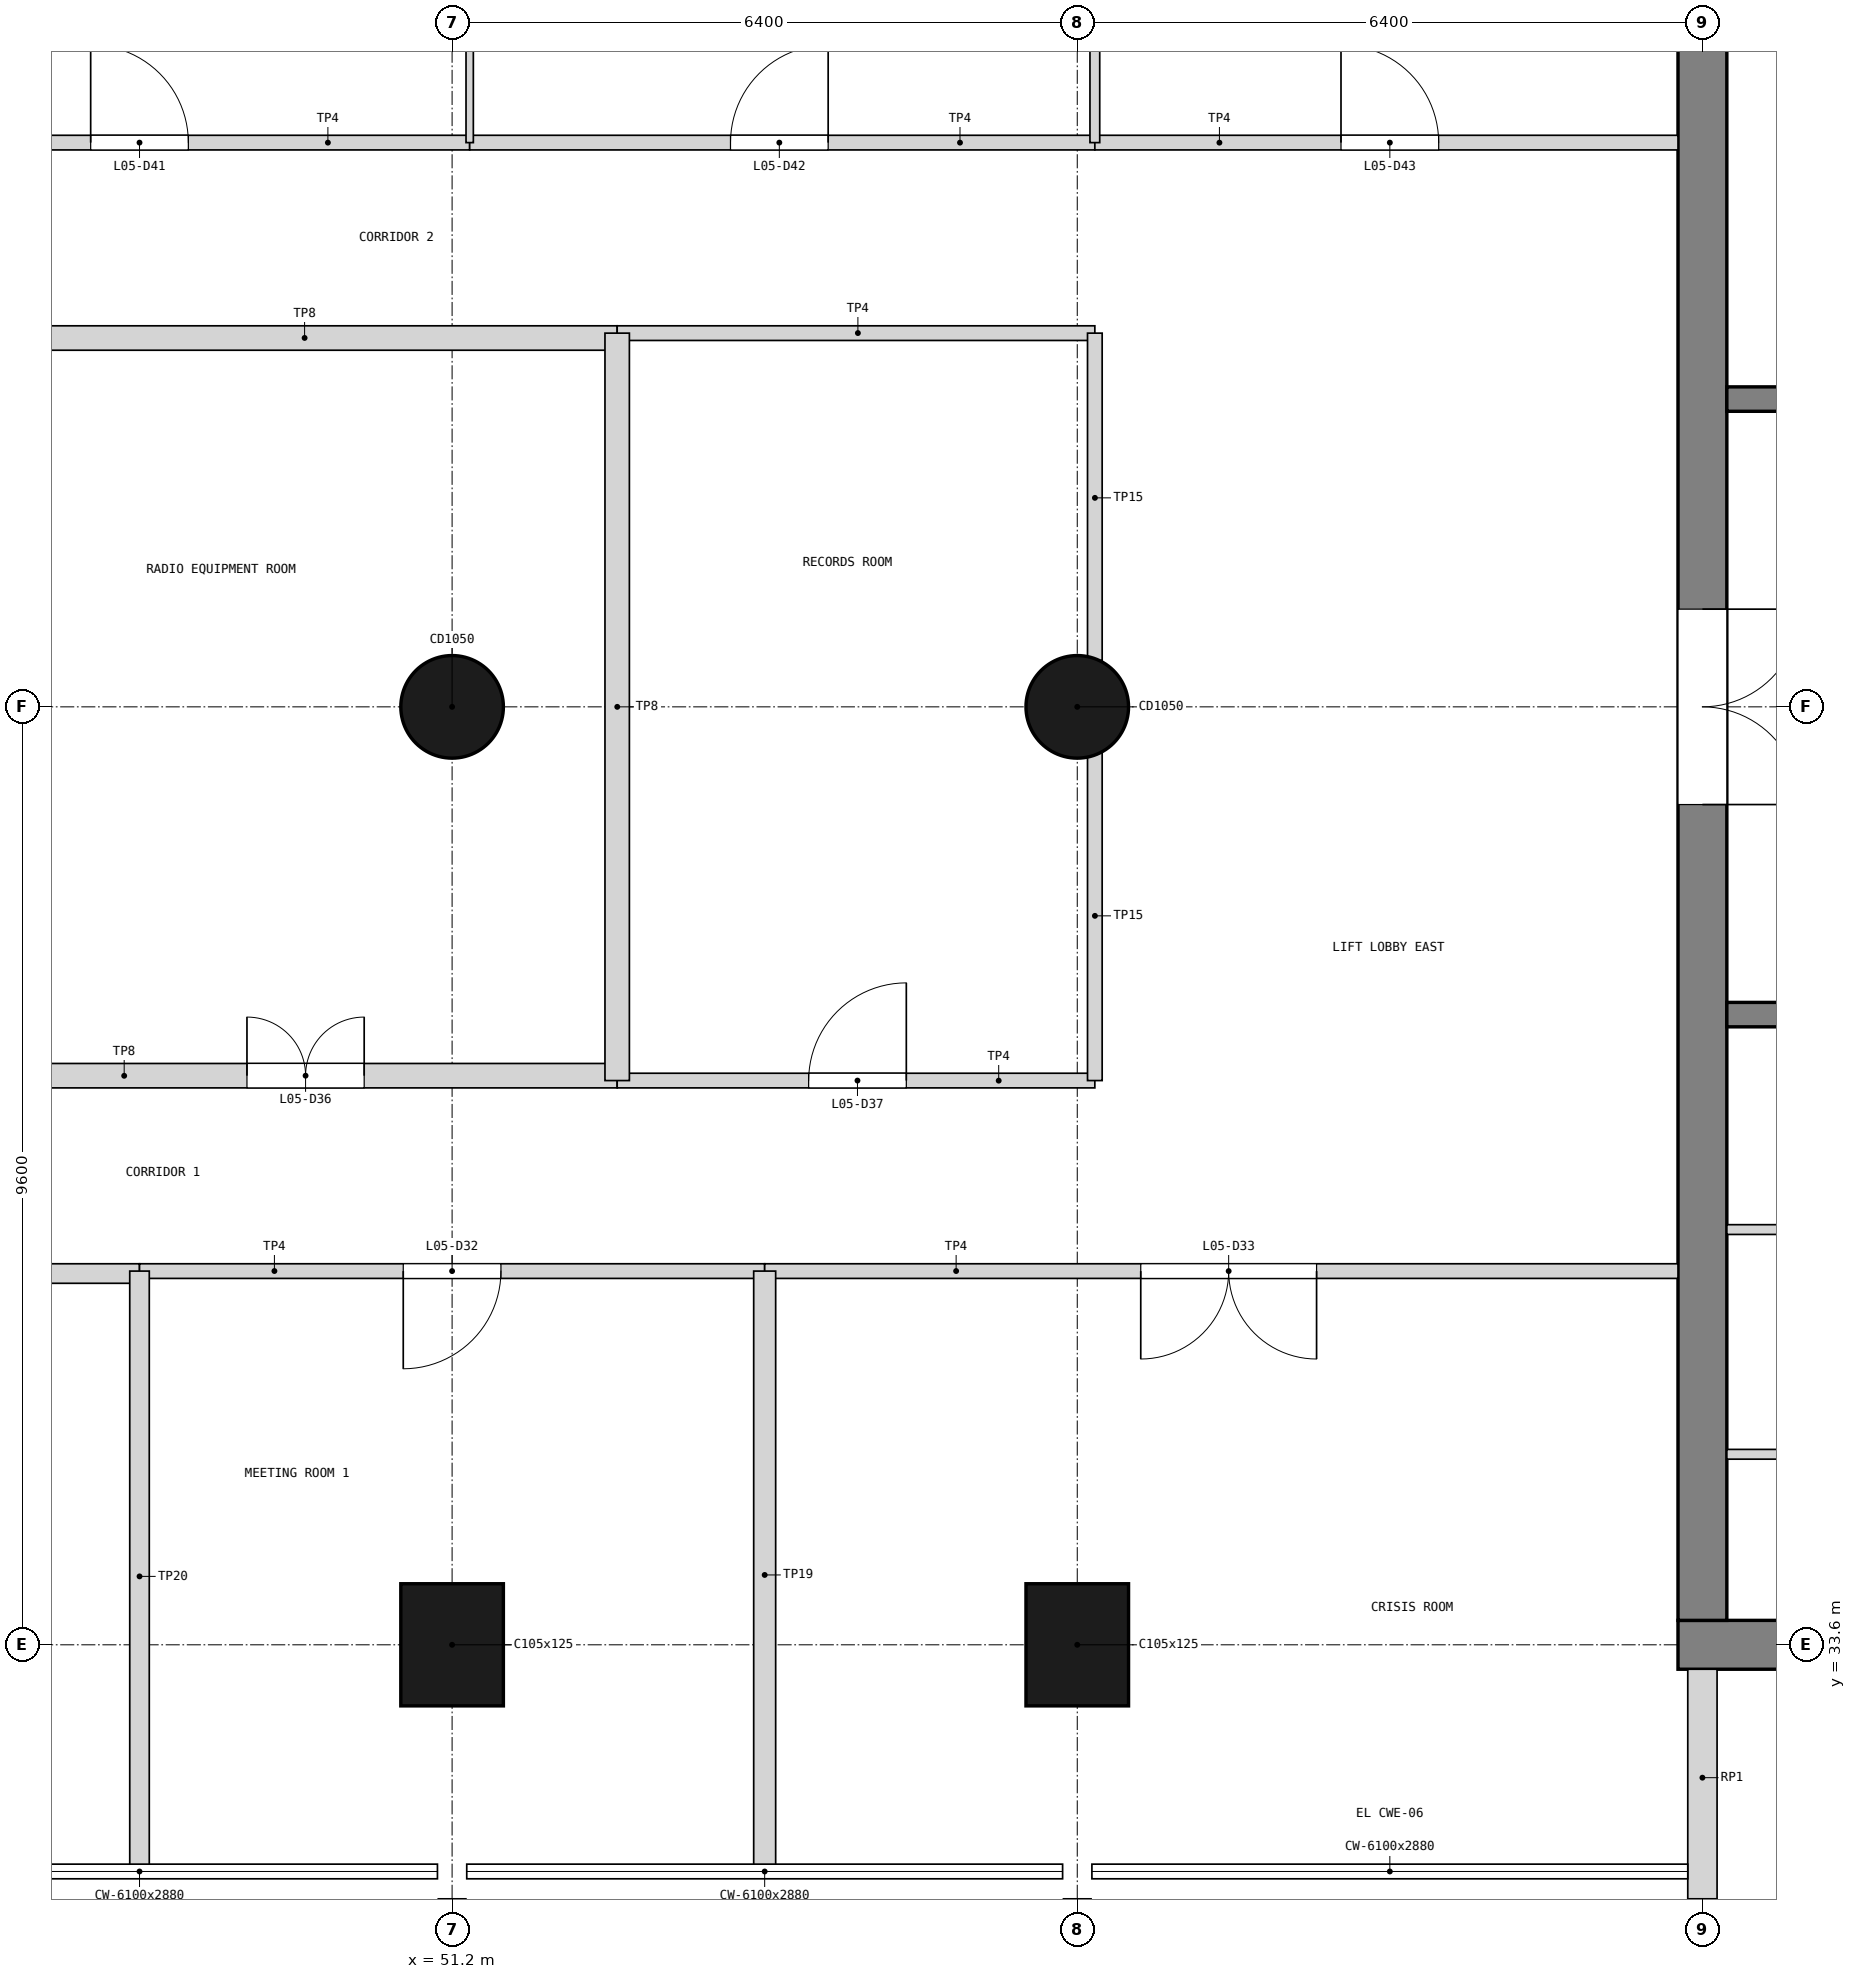
"""IFC4 building model, lengths in metres.
Left out: names, types, materials, properties, quantities, classifications, styles, units other than length and angle.
Written with IfcOpenShell. Run it as: python <this file> out.ifc"""

import sys

from ifc_helpers import new_model, si_unit, direction, frame, frame_2d, origin, origin_2d, place, context, subcontext, project, spatial, rectangle, circle, extrude, element, fill, save


model = new_model("IFC4")
c1 = context("Model", 3, precision=1e-05, world=origin(), true_north=direction((0.0, 1.0)))
c2 = subcontext(c1, "Body", "Model", "MODEL_VIEW")
j1 = project(units=[si_unit("LENGTHUNIT", "METRE"), si_unit("PLANEANGLEUNIT", "RADIAN")], contexts=[c1])
p1 = place(None, origin())
s1 = spatial("IfcSite", under=j1, at=p1, CompositionType="ELEMENT")
p2 = place(p1, origin())
s2 = spatial("IfcBuilding", under=s1, at=p2, CompositionType="ELEMENT")
p3 = place(p2, frame((0.0, 0.0, 21.0)))
s3 = spatial("IfcBuildingStorey", under=s2, at=p3, CompositionType="ELEMENT", Elevation=21.0)
p4 = place(p3, frame((63.75, 33.6, 0.0), z_axis=(0.0, 0.0, 1.0), x_axis=(1.0, 0.0, 0.0)))
e1 = element("IfcWall", 1, at=p4, inside=s3, PredefinedType="SHEAR", context=c2, shape_type="SweptSolid", body=[
    extrude(rectangle(XDim=13.3, YDim=0.5, at=frame_2d((6.65, 0.0))), origin(), (0.0, 0.0, 1.0), 3.9),
])
p5 = place(p4, frame((11.05, 0.0, 1.0)))
e2 = element("IfcOpeningElement", 2, at=p5, cuts=e1, PredefinedType="OPENING", context=c2, shape_type="SweptSolid", body=[
    extrude(rectangle(XDim=0.4, YDim=2.0, at=frame_2d((0.2, 1.0))), frame((0.0, 0.26, 0.0), z_axis=(0.0, -1.0, 0.0), x_axis=(1.0, 0.0, 0.0)), (0.0, 0.0, 1.0), 0.52),
])
p6 = place(p3, frame((64.0, 33.85, 0.0), z_axis=(0.0, 0.0, 1.0), x_axis=(0.0, 1.0, 0.0)))
e3 = element("IfcWall", 3, at=p6, inside=s3, PredefinedType="SHEAR", context=c2, shape_type="SweptSolid", body=[
    extrude(rectangle(XDim=18.7, YDim=0.5, at=frame_2d((9.35, 0.0))), origin(), (0.0, 0.0, 1.0), 3.9),
])
p7 = place(p6, frame((8.35, 0.0, 0.0)))
e4 = element("IfcOpeningElement", 4, at=p7, cuts=e3, PredefinedType="OPENING", context=c2, shape_type="SweptSolid", body=[
    extrude(rectangle(XDim=2.0, YDim=2.1, at=frame_2d((1.0, 1.05))), frame((0.0, 0.26, 0.0), z_axis=(0.0, -1.0, 0.0), x_axis=(1.0, 0.0, 0.0)), (0.0, 0.0, 1.0), 0.52),
])
p8 = place(p3, frame((51.2, 33.6, 0.0), z_axis=(0.0, 0.0, 1.0), x_axis=(1.0, 0.0, 0.0)))
e5 = element("IfcColumn", 5, at=p8, inside=s3, PredefinedType="COLUMN", context=c2, shape_type="SweptSolid", body=[
    extrude(rectangle(XDim=1.05, YDim=1.25, at=origin_2d()), origin(), (0.0, 0.0, 1.0), 3.9),
])
p9 = place(p3, frame((51.2, 43.2, 0.0), z_axis=(0.0, 0.0, 1.0), x_axis=(1.0, 0.0, 0.0)))
e6 = element("IfcColumn", 6, at=p9, inside=s3, PredefinedType="COLUMN", context=c2, shape_type="SweptSolid", body=[
    extrude(circle(Radius=0.525, at=origin_2d()), origin(), (0.0, 0.0, 1.0), 3.9),
])
p10 = place(p3, frame((57.6, 33.6, 0.0), z_axis=(0.0, 0.0, 1.0), x_axis=(1.0, 0.0, 0.0)))
e7 = element("IfcColumn", 7, at=p10, inside=s3, PredefinedType="COLUMN", context=c2, shape_type="SweptSolid", body=[
    extrude(rectangle(XDim=1.05, YDim=1.25, at=origin_2d()), origin(), (0.0, 0.0, 1.0), 3.9),
])
p11 = place(p3, frame((57.6, 43.2, 0.0), z_axis=(0.0, 0.0, 1.0), x_axis=(1.0, 0.0, 0.0)))
e8 = element("IfcColumn", 8, at=p11, inside=s3, PredefinedType="COLUMN", context=c2, shape_type="SweptSolid", body=[
    extrude(circle(Radius=0.525, at=origin_2d()), origin(), (0.0, 0.0, 1.0), 3.9),
])
p12 = place(p3, frame((64.0, 31.0, 0.0), z_axis=(0.0, 0.0, 1.0), x_axis=(0.0, 1.0, 0.0)))
e9 = element("IfcWall", 9, at=p12, inside=s3, PredefinedType="SOLIDWALL", context=c2, shape_type="SweptSolid", body=[
    extrude(rectangle(XDim=2.35, YDim=0.3, at=frame_2d((1.175, 0.0))), origin(), (0.0, 0.0, 1.0), 2.88),
])
for number, where, z_axis, x_axis in (
    (10, (69.725, 40.05, 0.0), (0.0, 0.0, 1.0), (-1.0, 0.0, 0.0)),
    (11, (69.725, 46.35, 0.0), (0.0, 0.0, 1.0), (-1.0, 0.0, 0.0)),
):
    element("IfcWall", number, at=place(p3, frame(where, z_axis=z_axis, x_axis=x_axis)), inside=s3, PredefinedType="SOLIDWALL", context=c2, shape_type="SweptSolid", body=[
        extrude(rectangle(XDim=5.475, YDim=0.25, at=frame_2d((2.738, 0.0))), origin(), (0.0, 0.0, 1.0), 3.6),
    ])
p13 = place(p3, frame((69.475, 35.55, 0.0), z_axis=(0.0, 0.0, 1.0), x_axis=(-1.0, 0.0, 0.0)))
e12 = element("IfcWall", 12, at=p13, inside=s3, PredefinedType="PARTITIONING", context=c2, shape_type="SweptSolid", body=[
    extrude(rectangle(XDim=5.225, YDim=0.1, at=frame_2d((2.613, 0.0))), origin(), (0.0, 0.0, 1.0), 3.6),
])
p14 = place(p3, frame((67.925, 37.85, 0.0), z_axis=(0.0, 0.0, 1.0), x_axis=(-1.0, 0.0, 0.0)))
e13 = element("IfcWall", 13, at=p14, inside=s3, PredefinedType="PARTITIONING", context=c2, shape_type="SweptSolid", body=[
    extrude(rectangle(XDim=3.675, YDim=0.1, at=frame_2d((1.837, 0.0))), origin(), (0.0, 0.0, 1.0), 3.6),
])
p15 = place(p3, frame((40.09, 37.4, 0.0), z_axis=(0.0, 0.0, 1.0), x_axis=(1.0, 0.0, 0.0)))
e14 = element("IfcWall", 14, at=p15, inside=s3, PredefinedType="PARTITIONING", context=c2, shape_type="SweptSolid", body=[
    extrude(rectangle(XDim=7.91, YDim=0.2, at=frame_2d((3.955, 0.0))), origin(), (0.0, 0.0, 1.0), 3.68),
])
p16 = place(p15, frame((3.46, 0.0, 0.0)))
e15 = element("IfcOpeningElement", 15, at=p16, cuts=e14, PredefinedType="OPENING", context=c2, shape_type="SweptSolid", body=[
    extrude(rectangle(XDim=1.0, YDim=2.1, at=frame_2d((0.5, 1.05))), frame((0.0, 0.11, 0.0), z_axis=(0.0, -1.0, 0.0), x_axis=(1.0, 0.0, 0.0)), (0.0, 0.0, 1.0), 0.22),
])
p17 = place(p3, frame((48.0, 37.425, 0.0), z_axis=(0.0, 0.0, 1.0), x_axis=(1.0, 0.0, 0.0)))
e16 = element("IfcWall", 16, at=p17, inside=s3, PredefinedType="PARTITIONING", context=c2, shape_type="SweptSolid", body=[
    extrude(rectangle(XDim=6.4, YDim=0.15, at=frame_2d((3.2, 0.0))), origin(), (0.0, 0.0, 1.0), 3.68),
])
p18 = place(p17, frame((2.7, 0.0, 0.0)))
e17 = element("IfcOpeningElement", 17, at=p18, cuts=e16, PredefinedType="OPENING", context=c2, shape_type="SweptSolid", body=[
    extrude(rectangle(XDim=1.0, YDim=2.1, at=frame_2d((0.5, 1.05))), frame((0.0, 0.085, 0.0), z_axis=(0.0, -1.0, 0.0), x_axis=(1.0, 0.0, 0.0)), (0.0, 0.0, 1.0), 0.17),
])
p19 = place(p3, frame((54.4, 37.425, 0.0), z_axis=(0.0, 0.0, 1.0), x_axis=(1.0, 0.0, 0.0)))
e18 = element("IfcWall", 18, at=p19, inside=s3, PredefinedType="PARTITIONING", context=c2, shape_type="SweptSolid", body=[
    extrude(rectangle(XDim=9.35, YDim=0.15, at=frame_2d((4.675, 0.0))), origin(), (0.0, 0.0, 1.0), 3.68),
])
p20 = place(p19, frame((3.85, 0.0, 0.0)))
e19 = element("IfcOpeningElement", 19, at=p20, cuts=e18, PredefinedType="OPENING", context=c2, shape_type="SweptSolid", body=[
    extrude(rectangle(XDim=1.8, YDim=2.1, at=frame_2d((0.9, 1.05))), frame((0.0, 0.085, 0.0), z_axis=(0.0, -1.0, 0.0), x_axis=(1.0, 0.0, 0.0)), (0.0, 0.0, 1.0), 0.17),
])
p21 = place(p3, frame((48.0, 31.3, 0.0), z_axis=(0.0, 0.0, 1.0), x_axis=(0.0, 1.0, 0.0)))
e20 = element("IfcWall", 20, at=p21, inside=s3, PredefinedType="PARTITIONING", context=c2, shape_type="SweptSolid", body=[
    extrude(rectangle(XDim=6.125, YDim=0.2, at=frame_2d((3.062, 0.0))), origin(), (0.0, 0.0, 1.0), 3.08),
])
p22 = place(p3, frame((54.4, 31.3, 0.0), z_axis=(0.0, 0.0, 1.0), x_axis=(0.0, 1.0, 0.0)))
e21 = element("IfcWall", 21, at=p22, inside=s3, PredefinedType="PARTITIONING", context=c2, shape_type="SweptSolid", body=[
    extrude(rectangle(XDim=6.125, YDim=0.225, at=frame_2d((3.062, 0.0))), origin(), (0.0, 0.0, 1.0), 3.08),
])
p23 = place(p3, frame((46.49, 39.425, 0.0), z_axis=(0.0, 0.0, 1.0), x_axis=(1.0, 0.0, 0.0)))
e22 = element("IfcWall", 22, at=p23, inside=s3, PredefinedType="PARTITIONING", context=c2, shape_type="SweptSolid", body=[
    extrude(rectangle(XDim=6.4, YDim=0.25, at=frame_2d((3.2, 0.0))), origin(), (0.0, 0.0, 1.0), 3.68),
])
p24 = place(p23, frame((2.61, 0.0, 0.0)))
e23 = element("IfcOpeningElement", 23, at=p24, cuts=e22, PredefinedType="OPENING", context=c2, shape_type="SweptSolid", body=[
    extrude(rectangle(XDim=1.2, YDim=2.1, at=frame_2d((0.6, 1.05))), frame((0.0, 0.135, 0.0), z_axis=(0.0, -1.0, 0.0), x_axis=(1.0, 0.0, 0.0)), (0.0, 0.0, 1.0), 0.27),
])
p25 = place(p3, frame((46.49, 46.975, 0.0), z_axis=(0.0, 0.0, 1.0), x_axis=(1.0, 0.0, 0.0)))
e24 = element("IfcWall", 24, at=p25, inside=s3, PredefinedType="PARTITIONING", context=c2, shape_type="SweptSolid", body=[
    extrude(rectangle(XDim=6.4, YDim=0.25, at=frame_2d((3.2, 0.0))), origin(), (0.0, 0.0, 1.0), 3.68),
])
p26 = place(p3, frame((52.89, 39.375, 0.0), z_axis=(0.0, 0.0, 1.0), x_axis=(1.0, 0.0, 0.0)))
e25 = element("IfcWall", 25, at=p26, inside=s3, PredefinedType="PARTITIONING", context=c2, shape_type="SweptSolid", body=[
    extrude(rectangle(XDim=4.89, YDim=0.15, at=frame_2d((2.445, 0.0))), origin(), (0.0, 0.0, 1.0), 3.68),
])
p27 = place(p26, frame((1.96, 0.0, 0.0)))
e26 = element("IfcOpeningElement", 26, at=p27, cuts=e25, PredefinedType="OPENING", context=c2, shape_type="SweptSolid", body=[
    extrude(rectangle(XDim=1.0, YDim=2.1, at=frame_2d((0.5, 1.05))), frame((0.0, 0.085, 0.0), z_axis=(0.0, -1.0, 0.0), x_axis=(1.0, 0.0, 0.0)), (0.0, 0.0, 1.0), 0.17),
])
p28 = place(p3, frame((52.89, 47.025, 0.0), z_axis=(0.0, 0.0, 1.0), x_axis=(1.0, 0.0, 0.0)))
e27 = element("IfcWall", 27, at=p28, inside=s3, PredefinedType="PARTITIONING", context=c2, shape_type="SweptSolid", body=[
    extrude(rectangle(XDim=4.89, YDim=0.15, at=frame_2d((2.445, 0.0))), origin(), (0.0, 0.0, 1.0), 3.68),
])
p29 = place(p3, frame((52.89, 39.375, 0.0), z_axis=(0.0, 0.0, 1.0), x_axis=(0.0, 1.0, 0.0)))
e28 = element("IfcWall", 28, at=p29, inside=s3, PredefinedType="PARTITIONING", context=c2, shape_type="SweptSolid", body=[
    extrude(rectangle(XDim=7.65, YDim=0.25, at=frame_2d((3.825, 0.0))), origin(), (0.0, 0.0, 1.0), 3.68),
])
p30 = place(p3, frame((44.62, 48.975, 0.0), z_axis=(0.0, 0.0, 1.0), x_axis=(1.0, 0.0, 0.0)))
e29 = element("IfcWall", 29, at=p30, inside=s3, PredefinedType="PARTITIONING", context=c2, shape_type="SweptSolid", body=[
    extrude(rectangle(XDim=6.76, YDim=0.15, at=frame_2d((3.38, 0.0))), origin(), (0.0, 0.0, 1.0), 3.68),
])
p31 = place(p30, frame((2.88, 0.0, 0.0)))
e30 = element("IfcOpeningElement", 30, at=p31, cuts=e29, PredefinedType="OPENING", context=c2, shape_type="SweptSolid", body=[
    extrude(rectangle(XDim=1.0, YDim=2.1, at=frame_2d((0.5, 1.05))), frame((0.0, 0.085, 0.0), z_axis=(0.0, -1.0, 0.0), x_axis=(1.0, 0.0, 0.0)), (0.0, 0.0, 1.0), 0.17),
])
p32 = place(p3, frame((51.38, 48.975, 0.0), z_axis=(0.0, 0.0, 1.0), x_axis=(1.0, 0.0, 0.0)))
e31 = element("IfcWall", 31, at=p32, inside=s3, PredefinedType="PARTITIONING", context=c2, shape_type="SweptSolid", body=[
    extrude(rectangle(XDim=6.4, YDim=0.15, at=frame_2d((3.2, 0.0))), origin(), (0.0, 0.0, 1.0), 3.68),
])
p33 = place(p32, frame((2.67, 0.0, 0.0)))
e32 = element("IfcOpeningElement", 32, at=p33, cuts=e31, PredefinedType="OPENING", context=c2, shape_type="SweptSolid", body=[
    extrude(rectangle(XDim=1.0, YDim=2.1, at=frame_2d((0.5, 1.05))), frame((0.0, 0.085, 0.0), z_axis=(0.0, -1.0, 0.0), x_axis=(1.0, 0.0, 0.0)), (0.0, 0.0, 1.0), 0.17),
])
p34 = place(p3, frame((57.78, 48.975, 0.0), z_axis=(0.0, 0.0, 1.0), x_axis=(1.0, 0.0, 0.0)))
e33 = element("IfcWall", 33, at=p34, inside=s3, PredefinedType="PARTITIONING", context=c2, shape_type="SweptSolid", body=[
    extrude(rectangle(XDim=5.97, YDim=0.15, at=frame_2d((2.985, 0.0))), origin(), (0.0, 0.0, 1.0), 3.68),
])
p35 = place(p34, frame((2.52, 0.0, 0.0)))
e34 = element("IfcOpeningElement", 34, at=p35, cuts=e33, PredefinedType="OPENING", context=c2, shape_type="SweptSolid", body=[
    extrude(rectangle(XDim=1.0, YDim=2.1, at=frame_2d((0.5, 1.05))), frame((0.0, 0.085, 0.0), z_axis=(0.0, -1.0, 0.0), x_axis=(1.0, 0.0, 0.0)), (0.0, 0.0, 1.0), 0.17),
])
p36 = place(p3, frame((51.38, 48.975, 0.0), z_axis=(0.0, 0.0, 1.0), x_axis=(0.0, 1.0, 0.0)))
e35 = element("IfcWall", 35, at=p36, inside=s3, PredefinedType="PARTITIONING", context=c2, shape_type="SweptSolid", body=[
    extrude(rectangle(XDim=3.22, YDim=0.075, at=frame_2d((1.61, 0.0))), origin(), (0.0, 0.0, 1.0), 2.78),
])
p37 = place(p3, frame((57.78, 48.975, 0.0), z_axis=(0.0, 0.0, 1.0), x_axis=(0.0, 1.0, 0.0)))
e36 = element("IfcWall", 36, at=p37, inside=s3, PredefinedType="PARTITIONING", context=c2, shape_type="SweptSolid", body=[
    extrude(rectangle(XDim=3.22, YDim=0.1, at=frame_2d((1.61, 0.0))), origin(), (0.0, 0.0, 1.0), 2.78),
])
for number, where, z_axis, x_axis in (
    (37, (57.78, 39.375, 0.0), (0.0, 0.0, 1.0), (0.0, 1.0, 0.0)),
    (38, (57.78, 43.673, 0.0), (0.0, 0.0, 1.0), (0.0, 1.0, 0.0)),
):
    element("IfcWall", number, at=place(p3, frame(where, z_axis=z_axis, x_axis=x_axis)), inside=s3, PredefinedType="PARTITIONING", context=c2, shape_type="SweptSolid", body=[
        extrude(rectangle(XDim=3.352, YDim=0.15, at=frame_2d((1.676, 0.0))), origin(), (0.0, 0.0, 1.0), 2.78),
    ])
p38 = place(p7, frame((2.0, 0.0, 0.0), z_axis=(0.0, 0.0, 1.0), x_axis=(-1.0, 0.0, 0.0)))
e39 = element("IfcDoor", 39, at=p38, inside=s3, OperationType="DOUBLE_DOOR_SINGLE_SWING", PredefinedType="DOOR", context=c2, shape_type="SweptSolid", body=[
    extrude(rectangle(XDim=2.0, YDim=2.1, at=frame_2d((1.0, 1.05))), frame((0.0, 0.025, 0.0), z_axis=(0.0, -1.0, 0.0), x_axis=(1.0, 0.0, 0.0)), (0.0, 0.0, 1.0), 0.05),
])
fill(e4, e39)
p39 = place(p18, frame((1.0, 0.0, 0.0), z_axis=(0.0, 0.0, 1.0), x_axis=(-1.0, 0.0, 0.0)))
e40 = element("IfcDoor", 40, at=p39, inside=s3, OperationType="SINGLE_SWING_RIGHT", PredefinedType="DOOR", context=c2, shape_type="SweptSolid", body=[
    extrude(rectangle(XDim=1.0, YDim=2.1, at=frame_2d((0.5, 1.05))), frame((0.0, 0.025, 0.0), z_axis=(0.0, -1.0, 0.0), x_axis=(1.0, 0.0, 0.0)), (0.0, 0.0, 1.0), 0.05),
])
fill(e17, e40)
p40 = place(p20, frame((1.8, 0.0, 0.0), z_axis=(0.0, 0.0, 1.0), x_axis=(-1.0, 0.0, 0.0)))
e41 = element("IfcDoor", 41, at=p40, inside=s3, OperationType="DOUBLE_DOOR_SINGLE_SWING", PredefinedType="DOOR", context=c2, shape_type="SweptSolid", body=[
    extrude(rectangle(XDim=1.8, YDim=2.1, at=frame_2d((0.9, 1.05))), frame((0.0, 0.025, 0.0), z_axis=(0.0, -1.0, 0.0), x_axis=(1.0, 0.0, 0.0)), (0.0, 0.0, 1.0), 0.05),
])
fill(e19, e41)
p41 = place(p24, origin())
e42 = element("IfcDoor", 42, at=p41, inside=s3, OperationType="DOUBLE_DOOR_SINGLE_SWING", PredefinedType="DOOR", context=c2, shape_type="SweptSolid", body=[
    extrude(rectangle(XDim=1.2, YDim=2.1, at=frame_2d((0.6, 1.05))), frame((0.0, 0.025, 0.0), z_axis=(0.0, -1.0, 0.0), x_axis=(1.0, 0.0, 0.0)), (0.0, 0.0, 1.0), 0.05),
])
fill(e23, e42)
p42 = place(p27, origin())
e43 = element("IfcDoor", 43, at=p42, inside=s3, OperationType="SINGLE_SWING_RIGHT", PredefinedType="DOOR", context=c2, shape_type="SweptSolid", body=[
    extrude(rectangle(XDim=1.0, YDim=2.1, at=frame_2d((0.5, 1.05))), frame((0.0, 0.025, 0.0), z_axis=(0.0, -1.0, 0.0), x_axis=(1.0, 0.0, 0.0)), (0.0, 0.0, 1.0), 0.05),
])
fill(e26, e43)
p43 = place(p31, origin())
e44 = element("IfcDoor", 44, at=p43, inside=s3, OperationType="SINGLE_SWING_LEFT", PredefinedType="DOOR", context=c2, shape_type="SweptSolid", body=[
    extrude(rectangle(XDim=1.0, YDim=2.1, at=frame_2d((0.5, 1.05))), frame((0.0, 0.025, 0.0), z_axis=(0.0, -1.0, 0.0), x_axis=(1.0, 0.0, 0.0)), (0.0, 0.0, 1.0), 0.05),
])
fill(e30, e44)
p44 = place(p33, origin())
e45 = element("IfcDoor", 45, at=p44, inside=s3, OperationType="SINGLE_SWING_RIGHT", PredefinedType="DOOR", context=c2, shape_type="SweptSolid", body=[
    extrude(rectangle(XDim=1.0, YDim=2.1, at=frame_2d((0.5, 1.05))), frame((0.0, 0.025, 0.0), z_axis=(0.0, -1.0, 0.0), x_axis=(1.0, 0.0, 0.0)), (0.0, 0.0, 1.0), 0.05),
])
fill(e32, e45)
p45 = place(p35, origin())
e46 = element("IfcDoor", 46, at=p45, inside=s3, OperationType="SINGLE_SWING_LEFT", PredefinedType="DOOR", context=c2, shape_type="SweptSolid", body=[
    extrude(rectangle(XDim=1.0, YDim=2.1, at=frame_2d((0.5, 1.05))), frame((0.0, 0.025, 0.0), z_axis=(0.0, -1.0, 0.0), x_axis=(1.0, 0.0, 0.0)), (0.0, 0.0, 1.0), 0.05),
])
fill(e34, e46)
save(model, sys.argv[1])
